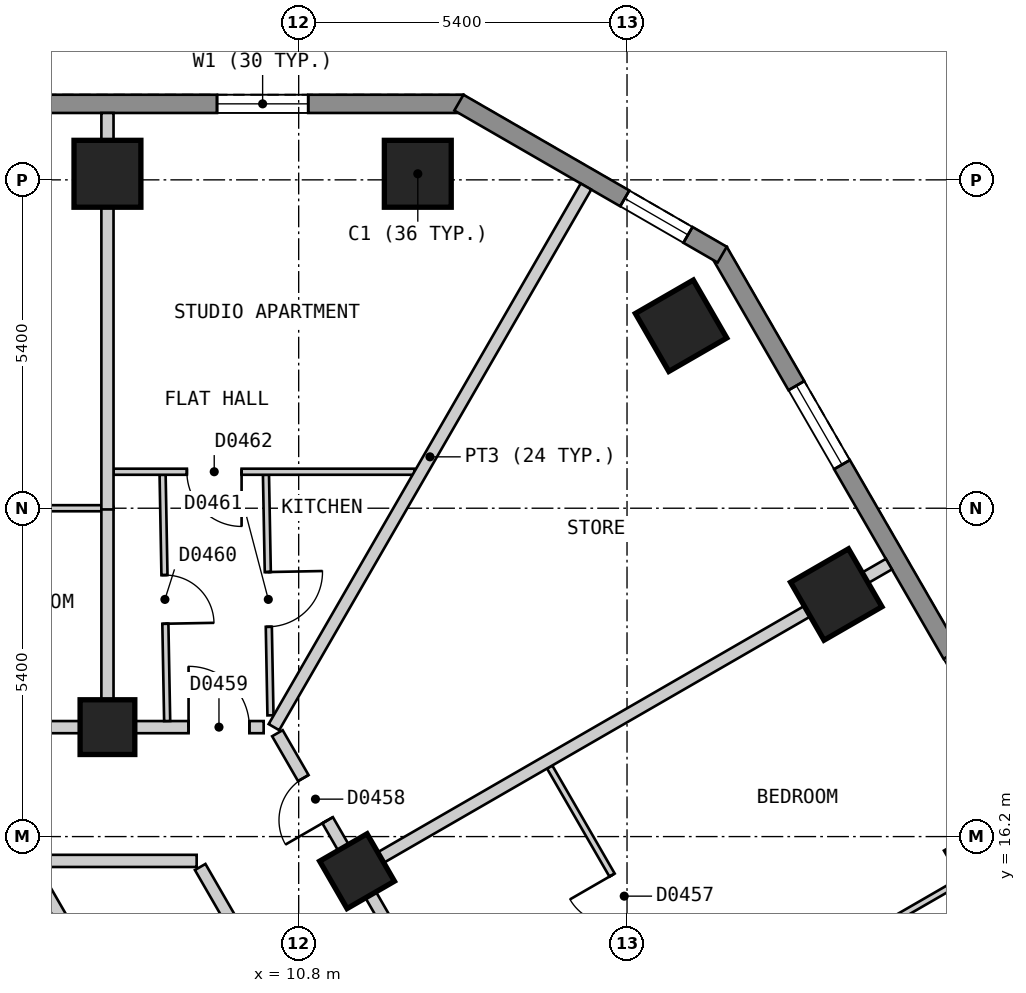
"""IFC4 building model, lengths in metres.
Left out: names, types, materials, properties, quantities, classifications, styles, units other than length and angle.
Written with IfcOpenShell. Run it as: python <this file> out.ifc"""

import sys

from ifc_helpers import new_model, si_unit, direction, frame, frame_2d, origin, origin_2d, place, context, subcontext, project, spatial, polyline, rectangle, outline, extrude, element, fill, save


model = new_model("IFC4")
c1 = context("Model", 3, precision=1e-05, world=origin(), true_north=direction((0.0, 1.0)))
c2 = subcontext(c1, "Body", "Model", "MODEL_VIEW")
j1 = project(units=[si_unit("LENGTHUNIT", "METRE"), si_unit("PLANEANGLEUNIT", "RADIAN")], contexts=[c1])
p1 = place(None, origin())
s1 = spatial("IfcSite", under=j1, at=p1, CompositionType="ELEMENT")
p2 = place(p1, origin())
s2 = spatial("IfcBuilding", under=s1, at=p2, CompositionType="ELEMENT")
p3 = place(p2, frame((0.0, 0.0, 38.4)))
s3 = spatial("IfcBuildingStorey", under=s2, at=p3, CompositionType="ELEMENT", Elevation=38.4)
for number, where, z_axis, x_axis in (
    (1, (12.759, 27.1, 0.0), (0.0, 0.0, 1.0), (-1.0, 0.0, 0.0)),
    (2, (7.655, 27.1, 0.0), (0.0, 0.0, 1.0), (-1.0, 0.0, 0.0)),
    (3, (22.193, 15.761, 0.0), (0.0, 0.0, 1.0), (-0.5, 0.866, 0.0)),
    (4, (19.641, 20.181, 0.0), (0.0, 0.0, 1.0), (-0.5, 0.866, 0.0)),
    (5, (17.089, 24.601, 0.0), (0.0, 0.0, 1.0), (-0.5, 0.866, 0.0)),
):
    element("IfcColumn", number, at=place(p3, frame(where, z_axis=z_axis, x_axis=x_axis)), inside=s3, PredefinedType="COLUMN", context=c2, shape_type="SweptSolid", body=[
        extrude(rectangle(XDim=1.1, YDim=1.1, at=origin_2d()), origin(), (0.0, 0.0, 1.0), 3.0),
    ])
for number, where, z_axis, x_axis in (
    (6, (11.76, 15.631, 0.0), (0.0, 0.0, 1.0), (-0.5, 0.866, 0.0)),
    (7, (7.655, 18.0, 0.0), (0.0, 0.0, 1.0), (-1.0, 0.0, 0.0)),
):
    element("IfcColumn", number, at=place(p3, frame(where, z_axis=z_axis, x_axis=x_axis)), inside=s3, PredefinedType="COLUMN", context=c2, shape_type="SweptSolid", body=[
        extrude(rectangle(XDim=0.9, YDim=0.9, at=origin_2d()), origin(), (0.0, 0.0, 1.0), 3.0),
    ])
p4 = place(p3, frame((13.51, 28.25, 0.0), z_axis=(0.0, 0.0, 1.0), x_axis=(-1.0, 0.0, 0.0)))
e8 = element("IfcWall", 8, at=p4, inside=s3, PredefinedType="SOLIDWALL", context=c2, shape_type="SweptSolid", body=[
    extrude(outline(polyline([(0.0, -0.15), (27.02, -0.15), (26.94, 0.15), (0.08, 0.15), (0.0, -0.15)])), origin(), (0.0, 0.0, 1.0), 2.7),
])
p5 = place(p4, frame((2.553, 0.0, 0.15)))
e9 = element("IfcOpeningElement", 9, at=p5, cuts=e8, PredefinedType="OPENING", context=c2, shape_type="SweptSolid", body=[
    extrude(rectangle(XDim=1.5, YDim=2.1, at=frame_2d((0.75, 1.05))), frame((0.0, 0.16, 0.0), z_axis=(0.0, -1.0, 0.0), x_axis=(1.0, 0.0, 0.0)), (0.0, 0.0, 1.0), 0.32),
])
p6 = place(p4, frame((7.657, 0.0, 0.15)))
e10 = element("IfcOpeningElement", 10, at=p6, cuts=e8, PredefinedType="OPENING", context=c2, shape_type="SweptSolid", body=[
    extrude(rectangle(XDim=1.5, YDim=2.1, at=frame_2d((0.75, 1.05))), frame((0.0, 0.16, 0.0), z_axis=(0.0, -1.0, 0.0), x_axis=(1.0, 0.0, 0.0)), (0.0, 0.0, 1.0), 0.32),
])
p7 = place(p4, frame((12.761, 0.0, 0.15)))
e11 = element("IfcOpeningElement", 11, at=p7, cuts=e8, PredefinedType="OPENING", context=c2, shape_type="SweptSolid", body=[
    extrude(rectangle(XDim=1.5, YDim=2.1, at=frame_2d((0.75, 1.05))), frame((0.0, 0.16, 0.0), z_axis=(0.0, -1.0, 0.0), x_axis=(1.0, 0.0, 0.0)), (0.0, 0.0, 1.0), 0.32),
])
p8 = place(p4, frame((17.865, 0.0, 0.15)))
e12 = element("IfcOpeningElement", 12, at=p8, cuts=e8, PredefinedType="OPENING", context=c2, shape_type="SweptSolid", body=[
    extrude(rectangle(XDim=1.5, YDim=2.1, at=frame_2d((0.75, 1.05))), frame((0.0, 0.16, 0.0), z_axis=(0.0, -1.0, 0.0), x_axis=(1.0, 0.0, 0.0)), (0.0, 0.0, 1.0), 0.32),
])
p9 = place(p4, frame((22.969, 0.0, 0.15)))
e13 = element("IfcOpeningElement", 13, at=p9, cuts=e8, PredefinedType="OPENING", context=c2, shape_type="SweptSolid", body=[
    extrude(rectangle(XDim=1.5, YDim=2.1, at=frame_2d((0.75, 1.05))), frame((0.0, 0.16, 0.0), z_axis=(0.0, -1.0, 0.0), x_axis=(1.0, 0.0, 0.0)), (0.0, 0.0, 1.0), 0.32),
])
p10 = place(p3, frame((31.22, 2.425, 0.0), z_axis=(0.0, 0.0, 1.0), x_axis=(-0.500001938803, 0.866024284413, 0.0)))
e14 = element("IfcWall", 14, at=p10, inside=s3, PredefinedType="SOLIDWALL", context=c2, shape_type="SweptSolid", body=[
    extrude(outline(polyline([(0.0, -0.15), (27.02, -0.15), (26.94, 0.15), (0.08, 0.15), (0.0, -0.15)])), origin(), (0.0, 0.0, 1.0), 2.7),
])
p11 = place(p10, frame((2.553, 0.0, 0.15)))
e15 = element("IfcOpeningElement", 15, at=p11, cuts=e14, PredefinedType="OPENING", context=c2, shape_type="SweptSolid", body=[
    extrude(rectangle(XDim=1.5, YDim=2.1, at=frame_2d((0.75, 1.05))), frame((0.0, 0.16, 0.0), z_axis=(0.0, -1.0, 0.0), x_axis=(1.0, 0.0, 0.0)), (0.0, 0.0, 1.0), 0.32),
])
p12 = place(p10, frame((7.657, 0.0, 0.15)))
e16 = element("IfcOpeningElement", 16, at=p12, cuts=e14, PredefinedType="OPENING", context=c2, shape_type="SweptSolid", body=[
    extrude(rectangle(XDim=1.5, YDim=2.1, at=frame_2d((0.75, 1.05))), frame((0.0, 0.16, 0.0), z_axis=(0.0, -1.0, 0.0), x_axis=(1.0, 0.0, 0.0)), (0.0, 0.0, 1.0), 0.32),
])
p13 = place(p10, frame((12.761, 0.0, 0.15)))
e17 = element("IfcOpeningElement", 17, at=p13, cuts=e14, PredefinedType="OPENING", context=c2, shape_type="SweptSolid", body=[
    extrude(rectangle(XDim=1.5, YDim=2.1, at=frame_2d((0.75, 1.05))), frame((0.0, 0.16, 0.0), z_axis=(0.0, -1.0, 0.0), x_axis=(1.0, 0.0, 0.0)), (0.0, 0.0, 1.0), 0.32),
])
p14 = place(p10, frame((17.865, 0.0, 0.15)))
e18 = element("IfcOpeningElement", 18, at=p14, cuts=e14, PredefinedType="OPENING", context=c2, shape_type="SweptSolid", body=[
    extrude(rectangle(XDim=1.5, YDim=2.1, at=frame_2d((0.75, 1.05))), frame((0.0, 0.16, 0.0), z_axis=(0.0, -1.0, 0.0), x_axis=(1.0, 0.0, 0.0)), (0.0, 0.0, 1.0), 0.32),
])
p15 = place(p10, frame((22.969, 0.0, 0.15)))
e19 = element("IfcOpeningElement", 19, at=p15, cuts=e14, PredefinedType="OPENING", context=c2, shape_type="SweptSolid", body=[
    extrude(rectangle(XDim=1.5, YDim=2.1, at=frame_2d((0.75, 1.05))), frame((0.0, 0.16, 0.0), z_axis=(0.0, -1.0, 0.0), x_axis=(1.0, 0.0, 0.0)), (0.0, 0.0, 1.0), 0.32),
])
p16 = place(p3, frame((17.765, 25.77, 0.0), z_axis=(0.0, 0.0, 1.0), x_axis=(-0.866010750942, 0.50002537861, 0.0)))
e20 = element("IfcWall", 20, at=p16, inside=s3, PredefinedType="SOLIDWALL", context=c2, shape_type="SweptSolid", body=[
    extrude(outline(polyline([(0.0, -0.15), (5.0, -0.15), (4.919, 0.15), (0.08, 0.15), (0.0, -0.15)])), origin(), (0.0, 0.0, 1.0), 2.7),
])
p17 = place(p16, frame((0.65, 0.0, 0.15)))
e21 = element("IfcOpeningElement", 21, at=p17, cuts=e20, PredefinedType="OPENING", context=c2, shape_type="SweptSolid", body=[
    extrude(rectangle(XDim=1.2, YDim=2.1, at=frame_2d((0.6, 1.05))), frame((0.0, 0.16, 0.0), z_axis=(0.0, -1.0, 0.0), x_axis=(1.0, 0.0, 0.0)), (0.0, 0.0, 1.0), 0.32),
])
p18 = place(p3, frame((6.409, 15.7, 0.0), z_axis=(0.0, 0.0, 1.0), x_axis=(0.499930377127, -0.866065596838, 0.0)))
e22 = element("IfcWall", 22, at=p18, inside=s3, PredefinedType="PARTITIONING", context=c2, shape_type="SweptSolid", body=[
    extrude(rectangle(XDim=8.775, YDim=0.2, at=frame_2d((4.388, 0.0))), origin(), (0.0, 0.0, 1.0), 2.7),
])
p19 = place(p3, frame((9.18, 15.7, 0.0), z_axis=(0.0, 0.0, 1.0), x_axis=(0.500003652032, -0.866023295272, 0.0)))
e23 = element("IfcWall", 23, at=p19, inside=s3, PredefinedType="PARTITIONING", context=c2, shape_type="SweptSolid", body=[
    extrude(rectangle(XDim=18.012, YDim=0.2, at=frame_2d((9.006, 0.0))), origin(), (0.0, 0.0, 1.0), 2.7),
])
p20 = place(p19, frame((8.556, 0.0, 0.0)))
e24 = element("IfcOpeningElement", 24, at=p20, cuts=e23, PredefinedType="OPENING", context=c2, shape_type="SweptSolid", body=[
    extrude(rectangle(XDim=0.9, YDim=2.1, at=frame_2d((0.45, 1.05))), frame((0.0, 0.11, 0.0), z_axis=(0.0, -1.0, 0.0), x_axis=(1.0, 0.0, 0.0)), (0.0, 0.0, 1.0), 0.22),
])
p21 = place(p3, frame((10.45, 17.9, 0.0), z_axis=(0.0, 0.0, 1.0), x_axis=(0.500034352617, -0.866005569383, 0.0)))
e25 = element("IfcWall", 25, at=p21, inside=s3, PredefinedType="PARTITIONING", context=c2, shape_type="SweptSolid", body=[
    extrude(rectangle(XDim=20.553, YDim=0.2, at=frame_2d((10.276, 0.0))), origin(), (0.0, 0.0, 1.0), 2.7),
])
p22 = place(p21, frame((9.775, 0.0, 0.0)))
e26 = element("IfcOpeningElement", 26, at=p22, cuts=e25, PredefinedType="OPENING", context=c2, shape_type="SweptSolid", body=[
    extrude(rectangle(XDim=1.0, YDim=2.1, at=frame_2d((0.5, 1.05))), frame((0.0, 0.11, 0.0), z_axis=(0.0, -1.0, 0.0), x_axis=(1.0, 0.0, 0.0)), (0.0, 0.0, 1.0), 0.22),
])
p23 = place(p21, frame((0.852, 0.0, 0.0)))
e27 = element("IfcOpeningElement", 27, at=p23, cuts=e25, PredefinedType="OPENING", context=c2, shape_type="SweptSolid", body=[
    extrude(rectangle(XDim=0.8, YDim=2.1, at=frame_2d((0.4, 1.05))), frame((0.0, 0.11, 0.0), z_axis=(0.0, -1.0, 0.0), x_axis=(1.0, 0.0, 0.0)), (0.0, 0.0, 1.0), 0.22),
])
p24 = place(p3, frame((6.351, 15.8, 0.0), z_axis=(0.0, 0.0, 1.0), x_axis=(1.0, 0.0, 0.0)))
e28 = element("IfcWall", 28, at=p24, inside=s3, PredefinedType="PARTITIONING", context=c2, shape_type="SweptSolid", body=[
    extrude(rectangle(XDim=2.771, YDim=0.2, at=frame_2d((1.385, 0.0))), origin(), (0.0, 0.0, 1.0), 2.7),
])
p25 = place(p3, frame((-10.276, 18.0, 0.0), z_axis=(0.0, 0.0, 1.0), x_axis=(1.0, 0.0, 0.0)))
e29 = element("IfcWall", 29, at=p25, inside=s3, PredefinedType="PARTITIONING", context=c2, shape_type="SweptSolid", body=[
    extrude(rectangle(XDim=20.5, YDim=0.2, at=frame_2d((10.25, 0.0))), origin(), (0.0, 0.0, 1.0), 2.7),
])
p26 = place(p25, frame((19.265, 0.0, 0.0)))
e30 = element("IfcOpeningElement", 30, at=p26, cuts=e29, PredefinedType="OPENING", context=c2, shape_type="SweptSolid", body=[
    extrude(rectangle(XDim=1.0, YDim=2.1, at=frame_2d((0.5, 1.05))), frame((0.0, 0.11, 0.0), z_axis=(0.0, -1.0, 0.0), x_axis=(1.0, 0.0, 0.0)), (0.0, 0.0, 1.0), 0.22),
])
p27 = place(p25, frame((9.775, 0.0, 0.0)))
e31 = element("IfcOpeningElement", 31, at=p27, cuts=e29, PredefinedType="OPENING", context=c2, shape_type="SweptSolid", body=[
    extrude(rectangle(XDim=1.0, YDim=2.1, at=frame_2d((0.5, 1.05))), frame((0.0, 0.11, 0.0), z_axis=(0.0, -1.0, 0.0), x_axis=(1.0, 0.0, 0.0)), (0.0, 0.0, 1.0), 0.22),
])
p28 = place(p25, frame((4.671, 0.0, 0.0)))
e32 = element("IfcOpeningElement", 32, at=p28, cuts=e29, PredefinedType="OPENING", context=c2, shape_type="SweptSolid", body=[
    extrude(rectangle(XDim=1.0, YDim=2.1, at=frame_2d((0.5, 1.05))), frame((0.0, 0.11, 0.0), z_axis=(0.0, -1.0, 0.0), x_axis=(1.0, 0.0, 0.0)), (0.0, 0.0, 1.0), 0.22),
])
p29 = place(p3, frame((14.928, 17.344, 0.0), z_axis=(0.0, 0.0, 1.0), x_axis=(0.500029609304, -0.86600830817, 0.0)))
e33 = element("IfcWall", 33, at=p29, inside=s3, PredefinedType="PARTITIONING", context=c2, shape_type="SweptSolid", body=[
    extrude(rectangle(XDim=4.954, YDim=0.1, at=frame_2d((2.477, 0.0))), origin(), (0.0, 0.0, 1.0), 2.7),
])
p30 = place(p29, frame((2.052, 0.0, 0.0)))
e34 = element("IfcOpeningElement", 34, at=p30, cuts=e33, PredefinedType="OPENING", context=c2, shape_type="SweptSolid", body=[
    extrude(rectangle(XDim=0.8, YDim=2.1, at=frame_2d((0.4, 1.05))), frame((0.0, 0.06, 0.0), z_axis=(0.0, -1.0, 0.0), x_axis=(1.0, 0.0, 0.0)), (0.0, 0.0, 1.0), 0.12),
])
p31 = place(p3, frame((8.562, 22.15, 0.0), z_axis=(0.0, 0.0, 1.0), x_axis=(0.018504185939, -0.999828782894, 0.0)))
e35 = element("IfcWall", 35, at=p31, inside=s3, PredefinedType="PARTITIONING", context=c2, shape_type="SweptSolid", body=[
    extrude(rectangle(XDim=4.051, YDim=0.1, at=frame_2d((2.025, 0.0))), origin(), (0.0, 0.0, 1.0), 2.7),
])
p32 = place(p31, frame((1.65, 0.0, 0.0)))
e36 = element("IfcOpeningElement", 36, at=p32, cuts=e35, PredefinedType="OPENING", context=c2, shape_type="SweptSolid", body=[
    extrude(rectangle(XDim=0.8, YDim=2.1, at=frame_2d((0.4, 1.05))), frame((0.0, 0.06, 0.0), z_axis=(0.0, -1.0, 0.0), x_axis=(1.0, 0.0, 0.0)), (0.0, 0.0, 1.0), 0.12),
])
p33 = place(p3, frame((10.262, 22.15, 0.0), z_axis=(0.0, 0.0, 1.0), x_axis=(0.018696971826, -0.999825196344, 0.0)))
e37 = element("IfcWall", 37, at=p33, inside=s3, PredefinedType="PARTITIONING", context=c2, shape_type="SweptSolid", body=[
    extrude(rectangle(XDim=3.957, YDim=0.1, at=frame_2d((1.978, 0.0))), origin(), (0.0, 0.0, 1.0), 2.7),
])
p34 = place(p33, frame((1.6, 0.0, 0.0)))
e38 = element("IfcOpeningElement", 38, at=p34, cuts=e37, PredefinedType="OPENING", context=c2, shape_type="SweptSolid", body=[
    extrude(rectangle(XDim=0.9, YDim=2.1, at=frame_2d((0.45, 1.05))), frame((0.0, 0.06, 0.0), z_axis=(0.0, -1.0, 0.0), x_axis=(1.0, 0.0, 0.0)), (0.0, 0.0, 1.0), 0.12),
])
p35 = place(p3, frame((2.601, 21.6, 0.0), z_axis=(0.0, 0.0, 1.0), x_axis=(1.0, 0.0, 0.0)))
e39 = element("IfcWall", 39, at=p35, inside=s3, PredefinedType="PARTITIONING", context=c2, shape_type="SweptSolid", body=[
    extrude(rectangle(XDim=4.954, YDim=0.1, at=frame_2d((2.477, 0.0))), origin(), (0.0, 0.0, 1.0), 2.7),
])
p36 = place(p35, frame((2.102, 0.0, 0.0)))
e40 = element("IfcOpeningElement", 40, at=p36, cuts=e39, PredefinedType="OPENING", context=c2, shape_type="SweptSolid", body=[
    extrude(rectangle(XDim=0.8, YDim=2.1, at=frame_2d((0.4, 1.05))), frame((0.0, 0.06, 0.0), z_axis=(0.0, -1.0, 0.0), x_axis=(1.0, 0.0, 0.0)), (0.0, 0.0, 1.0), 0.12),
])
p37 = place(p3, frame((7.755, 22.2, 0.0), z_axis=(0.0, 0.0, 1.0), x_axis=(1.0, 0.0, 0.0)))
e41 = element("IfcWall", 41, at=p37, inside=s3, PredefinedType="PARTITIONING", context=c2, shape_type="SweptSolid", body=[
    extrude(rectangle(XDim=4.947, YDim=0.1, at=frame_2d((2.474, 0.0))), origin(), (0.0, 0.0, 1.0), 2.7),
])
p38 = place(p37, frame((1.206, 0.0, 0.0)))
e42 = element("IfcOpeningElement", 42, at=p38, cuts=e41, PredefinedType="OPENING", context=c2, shape_type="SweptSolid", body=[
    extrude(rectangle(XDim=0.9, YDim=2.1, at=frame_2d((0.45, 1.05))), frame((0.0, 0.06, 0.0), z_axis=(0.0, -1.0, 0.0), x_axis=(1.0, 0.0, 0.0)), (0.0, 0.0, 1.0), 0.12),
])
p39 = place(p3, frame((14.399, 11.261, 0.0), z_axis=(0.0, 0.0, 1.0), x_axis=(0.866022959057, 0.500004234368, 0.0)))
e43 = element("IfcWall", 43, at=p39, inside=s3, PredefinedType="PARTITIONING", context=c2, shape_type="SweptSolid", body=[
    extrude(rectangle(XDim=10.0, YDim=0.1, at=frame_2d((5.0, 0.0))), origin(), (0.0, 0.0, 1.0), 2.7),
])
p40 = place(p39, frame((4.775, 0.0, 0.0)))
e44 = element("IfcOpeningElement", 44, at=p40, cuts=e43, PredefinedType="OPENING", context=c2, shape_type="SweptSolid", body=[
    extrude(rectangle(XDim=0.9, YDim=2.1, at=frame_2d((0.45, 1.05))), frame((0.0, 0.06, 0.0), z_axis=(0.0, -1.0, 0.0), x_axis=(1.0, 0.0, 0.0)), (0.0, 0.0, 1.0), 0.12),
])
p41 = place(p3, frame((7.655, 21.62, 0.0), z_axis=(0.0, 0.0, 1.0), x_axis=(0.0, -1.0, 0.0)))
e45 = element("IfcWall", 45, at=p41, inside=s3, PredefinedType="PARTITIONING", context=c2, shape_type="SweptSolid", body=[
    extrude(rectangle(XDim=3.52, YDim=0.2, at=frame_2d((1.76, 0.0))), origin(), (0.0, 0.0, 1.0), 2.7),
])
p42 = place(p3, frame((10.393, 18.0, 0.0), z_axis=(0.0, 0.0, 1.0), x_axis=(0.499945497007, 0.866056868816, 0.0)))
e46 = element("IfcWall", 46, at=p42, inside=s3, PredefinedType="PARTITIONING", context=c2, shape_type="SweptSolid", body=[
    extrude(rectangle(XDim=10.265, YDim=0.2, at=frame_2d((5.132, 0.0))), origin(), (0.0, 0.0, 1.0), 2.7),
])
p43 = place(p3, frame((7.655, 21.58, 0.0), z_axis=(0.0, 0.0, 1.0), x_axis=(0.0, 1.0, 0.0)))
e47 = element("IfcWall", 47, at=p43, inside=s3, PredefinedType="PARTITIONING", context=c2, shape_type="SweptSolid", body=[
    extrude(rectangle(XDim=6.52, YDim=0.2, at=frame_2d((3.26, 0.0))), origin(), (0.0, 0.0, 1.0), 2.7),
])
p44 = place(p3, frame((11.847, 15.681, 0.0), z_axis=(0.0, 0.0, 1.0), x_axis=(0.866022959057, 0.500004234368, 0.0)))
e48 = element("IfcWall", 48, at=p44, inside=s3, PredefinedType="PARTITIONING", context=c2, shape_type="SweptSolid", body=[
    extrude(rectangle(XDim=10.0, YDim=0.2, at=frame_2d((5.0, 0.0))), origin(), (0.0, 0.0, 1.0), 2.7),
])
p45 = place(p5, origin())
e49 = element("IfcWindow", 49, at=p45, inside=s3, PartitioningType="SINGLE_PANEL", PredefinedType="WINDOW", context=c2, shape_type="SweptSolid", body=[
    extrude(rectangle(XDim=1.5, YDim=2.1, at=frame_2d((0.75, 1.05))), frame((0.0, 0.03, 0.0), z_axis=(0.0, -1.0, 0.0), x_axis=(1.0, 0.0, 0.0)), (0.0, 0.0, 1.0), 0.06),
])
fill(e9, e49)
p46 = place(p15, origin())
e50 = element("IfcWindow", 50, at=p46, inside=s3, PartitioningType="SINGLE_PANEL", PredefinedType="WINDOW", context=c2, shape_type="SweptSolid", body=[
    extrude(rectangle(XDim=1.5, YDim=2.1, at=frame_2d((0.75, 1.05))), frame((0.0, 0.03, 0.0), z_axis=(0.0, -1.0, 0.0), x_axis=(1.0, 0.0, 0.0)), (0.0, 0.0, 1.0), 0.06),
])
fill(e19, e50)
p47 = place(p17, origin())
e51 = element("IfcWindow", 51, at=p47, inside=s3, PartitioningType="SINGLE_PANEL", PredefinedType="WINDOW", context=c2, shape_type="SweptSolid", body=[
    extrude(rectangle(XDim=1.2, YDim=2.1, at=frame_2d((0.6, 1.05))), frame((0.0, 0.03, 0.0), z_axis=(0.0, -1.0, 0.0), x_axis=(1.0, 0.0, 0.0)), (0.0, 0.0, 1.0), 0.06),
])
fill(e21, e51)
p48 = place(p30, origin())
e52 = element("IfcDoor", 52, at=p48, inside=s3, OperationType="SINGLE_SWING_LEFT", PredefinedType="DOOR", context=c2, shape_type="SweptSolid", body=[
    extrude(rectangle(XDim=0.8, YDim=2.1, at=frame_2d((0.4, 1.05))), frame((0.0, 0.025, 0.0), z_axis=(0.0, -1.0, 0.0), x_axis=(1.0, 0.0, 0.0)), (0.0, 0.0, 1.0), 0.05),
])
fill(e34, e52)
p49 = place(p23, origin())
e53 = element("IfcDoor", 53, at=p49, inside=s3, OperationType="SINGLE_SWING_RIGHT", PredefinedType="DOOR", context=c2, shape_type="SweptSolid", body=[
    extrude(rectangle(XDim=0.8, YDim=2.1, at=frame_2d((0.4, 1.05))), frame((0.0, 0.025, 0.0), z_axis=(0.0, -1.0, 0.0), x_axis=(1.0, 0.0, 0.0)), (0.0, 0.0, 1.0), 0.05),
])
fill(e27, e53)
p50 = place(p26, origin())
e54 = element("IfcDoor", 54, at=p50, inside=s3, OperationType="SINGLE_SWING_LEFT", PredefinedType="DOOR", context=c2, shape_type="SweptSolid", body=[
    extrude(rectangle(XDim=1.0, YDim=2.1, at=frame_2d((0.5, 1.05))), frame((0.0, 0.025, 0.0), z_axis=(0.0, -1.0, 0.0), x_axis=(1.0, 0.0, 0.0)), (0.0, 0.0, 1.0), 0.05),
])
fill(e30, e54)
p51 = place(p32, origin())
e55 = element("IfcDoor", 55, at=p51, inside=s3, OperationType="SINGLE_SWING_RIGHT", PredefinedType="DOOR", context=c2, shape_type="SweptSolid", body=[
    extrude(rectangle(XDim=0.8, YDim=2.1, at=frame_2d((0.4, 1.05))), frame((0.0, 0.025, 0.0), z_axis=(0.0, -1.0, 0.0), x_axis=(1.0, 0.0, 0.0)), (0.0, 0.0, 1.0), 0.05),
])
fill(e36, e55)
p52 = place(p34, origin())
e56 = element("IfcDoor", 56, at=p52, inside=s3, OperationType="SINGLE_SWING_LEFT", PredefinedType="DOOR", context=c2, shape_type="SweptSolid", body=[
    extrude(rectangle(XDim=0.9, YDim=2.1, at=frame_2d((0.45, 1.05))), frame((0.0, 0.025, 0.0), z_axis=(0.0, -1.0, 0.0), x_axis=(1.0, 0.0, 0.0)), (0.0, 0.0, 1.0), 0.05),
])
fill(e38, e56)
p53 = place(p38, origin())
e57 = element("IfcDoor", 57, at=p53, inside=s3, OperationType="SINGLE_SWING_RIGHT", PredefinedType="DOOR", context=c2, shape_type="SweptSolid", body=[
    extrude(rectangle(XDim=0.9, YDim=2.1, at=frame_2d((0.45, 1.05))), frame((0.0, 0.025, 0.0), z_axis=(0.0, -1.0, 0.0), x_axis=(1.0, 0.0, 0.0)), (0.0, 0.0, 1.0), 0.05),
])
fill(e42, e57)
save(model, sys.argv[1])
